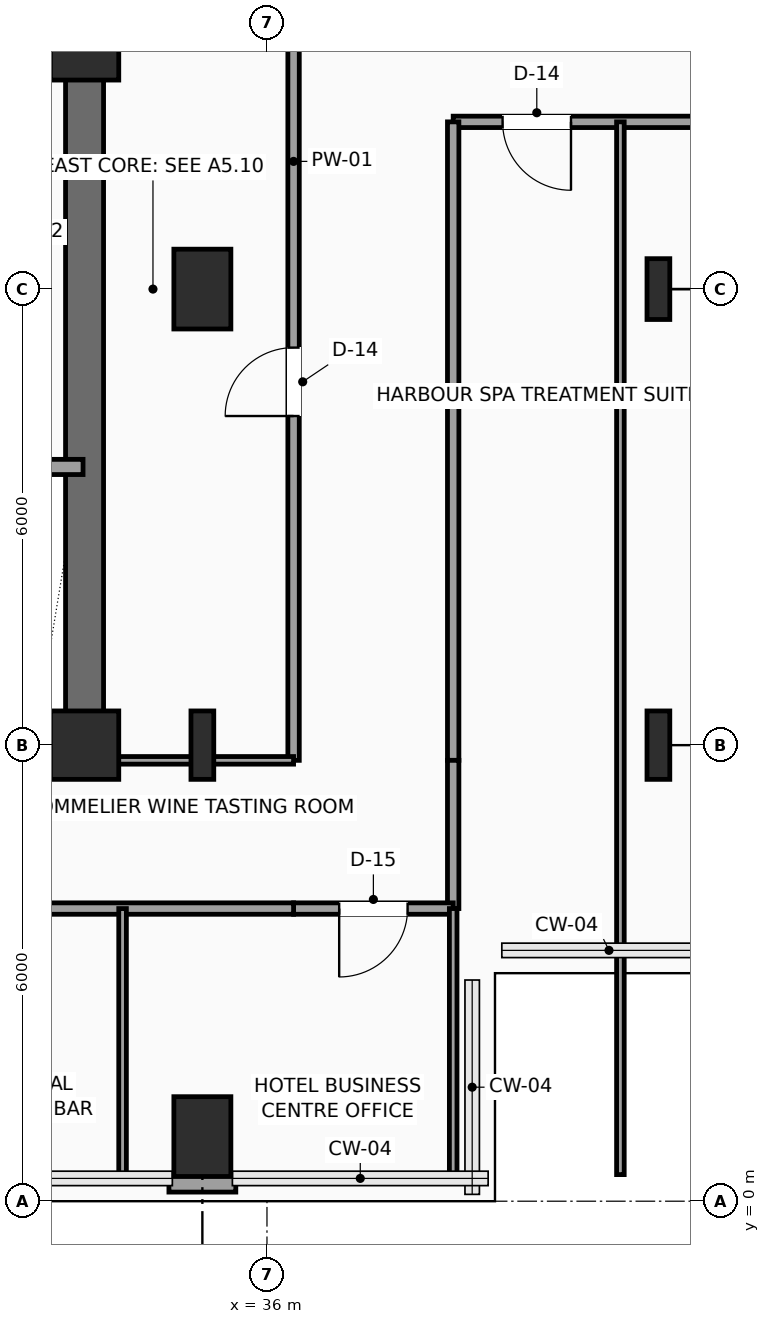
"""IFC4 building model, lengths in metres.
Left out: names, types, materials, properties, quantities, classifications, styles, units other than length and angle.
Written with IfcOpenShell. Run it as: python <this file> out.ifc"""

import sys

from ifc_helpers import new_model, si_unit, direction, frame, frame_2d, origin, origin_2d, place, context, subcontext, project, spatial, rectangle, i_section, extrude, element, fill, save


model = new_model("IFC4")
c1 = context("Model", 3, precision=1e-05, world=origin(), true_north=direction((0.0, 1.0)))
c2 = subcontext(c1, "Body", "Model", "MODEL_VIEW")
j1 = project(units=[si_unit("LENGTHUNIT", "METRE"), si_unit("PLANEANGLEUNIT", "RADIAN")], contexts=[c1])
p1 = place(None, origin())
s1 = spatial("IfcSite", under=j1, at=p1, CompositionType="ELEMENT")
p2 = place(p1, origin())
s2 = spatial("IfcBuilding", under=s1, at=p2, CompositionType="ELEMENT")
p3 = place(p2, frame((0.0, 0.0, 191.7)))
s3 = spatial("IfcBuildingStorey", under=s2, at=p3, CompositionType="ELEMENT", Elevation=191.7)
for number, where, z_axis, x_axis in (
    (1, (33.6, 6.0, 0.0), (0.0, 0.0, 1.0), (1.0, 0.0, 0.0)),
    (2, (33.6, 15.2, 0.0), (0.0, 0.0, 1.0), (1.0, 0.0, 0.0)),
):
    element("IfcColumn", number, at=place(p3, frame(where, z_axis=z_axis, x_axis=x_axis)), inside=s3, PredefinedType="COLUMN", context=c2, shape_type="SweptSolid", body=[
        extrude(rectangle(XDim=0.9, YDim=0.9, at=origin_2d()), origin(), (0.0, 0.0, 1.0), 3.75),
    ])
p4 = place(p3, frame((35.15, 0.85, 0.0), z_axis=(0.0, 0.0, 1.0), x_axis=(1.0, 0.0, 0.0)))
e3 = element("IfcColumn", 3, at=p4, inside=s3, PredefinedType="COLUMN", context=c2, shape_type="SweptSolid", body=[
    extrude(rectangle(XDim=0.75, YDim=1.05, at=origin_2d()), origin(), (0.0, 0.0, 1.0), 3.75),
])
p5 = place(p3, frame((35.15, 6.0, 0.0), z_axis=(0.0, 0.0, 1.0), x_axis=(1.0, 0.0, 0.0)))
e4 = element("IfcColumn", 4, at=p5, inside=s3, PredefinedType="COLUMN", context=c2, shape_type="SweptSolid", body=[
    extrude(i_section(OverallWidth=0.3, OverallDepth=0.9, WebThickness=0.019, FlangeThickness=0.035, FilletRadius=0.03, at=origin_2d()), origin(), (0.0, 0.0, 1.0), 3.75),
])
p6 = place(p3, frame((35.15, 12.0, 0.0), z_axis=(0.0, 0.0, 1.0), x_axis=(1.0, 0.0, 0.0)))
e5 = element("IfcColumn", 5, at=p6, inside=s3, PredefinedType="COLUMN", context=c2, shape_type="SweptSolid", body=[
    extrude(rectangle(XDim=0.75, YDim=1.05, at=origin_2d()), origin(), (0.0, 0.0, 1.0), 3.75),
])
p7 = place(p3, frame((41.15, 6.0, 0.0), z_axis=(0.0, 0.0, 1.0), x_axis=(1.0, 0.0, 0.0)))
e6 = element("IfcColumn", 6, at=p7, inside=s3, PredefinedType="COLUMN", context=c2, shape_type="SweptSolid", body=[
    extrude(i_section(OverallWidth=0.3, OverallDepth=0.9, WebThickness=0.019, FlangeThickness=0.035, FilletRadius=0.03, at=origin_2d()), origin(), (0.0, 0.0, 1.0), 3.75),
])
p8 = place(p3, frame((41.15, 12.0, 0.0), z_axis=(0.0, 0.0, 1.0), x_axis=(1.0, 0.0, 0.0)))
e7 = element("IfcColumn", 7, at=p8, inside=s3, PredefinedType="COLUMN", context=c2, shape_type="SweptSolid", body=[
    extrude(i_section(OverallWidth=0.3, OverallDepth=0.8, WebThickness=0.018, FlangeThickness=0.033, FilletRadius=0.03, at=origin_2d()), origin(), (0.0, 0.0, 1.0), 3.75),
])
p9 = place(p3, frame((35.59, 0.24, 0.0), z_axis=(0.0, 0.0, 1.0), x_axis=(-1.0, 0.0, 0.0)))
e8 = element("IfcWall", 8, at=p9, inside=s3, PredefinedType="SOLIDWALL", context=c2, shape_type="SweptSolid", body=[
    extrude(rectangle(XDim=0.88, YDim=0.24, at=frame_2d((0.44, 0.0))), origin(), (0.0, 0.0, 1.0), 3.54),
])
p10 = place(p3, frame((24.0, 6.0, 0.0), z_axis=(0.0, 0.0, 1.0), x_axis=(1.0, 0.0, 0.0)))
e9 = element("IfcWall", 9, at=p10, inside=s3, PredefinedType="SHEAR", context=c2, shape_type="SweptSolid", body=[
    extrude(rectangle(XDim=9.6, YDim=0.5, at=frame_2d((4.8, 0.0))), origin(), (0.0, 0.0, 1.0), 3.54),
])
p11 = place(p3, frame((33.6, 6.0, 0.0), z_axis=(0.0, 0.0, 1.0), x_axis=(0.0, 1.0, 0.0)))
e10 = element("IfcWall", 10, at=p11, inside=s3, PredefinedType="SHEAR", context=c2, shape_type="SweptSolid", body=[
    extrude(rectangle(XDim=12.0, YDim=0.5, at=frame_2d((6.0, 0.0))), origin(), (0.0, 0.0, 1.0), 3.54),
])
p12 = place(p11, frame((10.2, 0.0, 0.0)))
e11 = element("IfcOpeningElement", 11, at=p12, cuts=e10, PredefinedType="OPENING", context=c2, shape_type="SweptSolid", body=[
    extrude(rectangle(XDim=0.9, YDim=2.15, at=frame_2d((0.45, 1.075))), frame((0.0, 0.26, 0.0), z_axis=(0.0, -1.0, 0.0), x_axis=(1.0, 0.0, 0.0)), (0.0, 0.0, 1.0), 0.52),
])
p13 = place(p3, frame((29.26, 15.18, 0.0), z_axis=(0.0, 0.0, 1.0), x_axis=(1.0, 0.0, 0.0)))
e12 = element("IfcWall", 12, at=p13, inside=s3, PredefinedType="SHEAR", context=c2, shape_type="SweptSolid", body=[
    extrude(rectangle(XDim=4.04, YDim=0.2, at=frame_2d((2.02, 0.0))), origin(), (0.0, 0.0, 1.0), 3.54),
])
p14 = place(p3, frame((32.94, 9.66, 0.0), z_axis=(0.0, 0.0, 1.0), x_axis=(1.0, 0.0, 0.0)))
e13 = element("IfcWall", 13, at=p14, inside=s3, PredefinedType="SOLIDWALL", context=c2, shape_type="SweptSolid", body=[
    extrude(rectangle(XDim=0.64, YDim=0.2, at=frame_2d((0.32, 0.0))), origin(), (0.0, 0.0, 1.0), 3.54),
])
p15 = place(p3, frame((36.35, 5.8, 0.0), z_axis=(0.0, 0.0, 1.0), x_axis=(0.0, 1.0, 0.0)))
e14 = element("IfcWall", 14, at=p15, inside=s3, PredefinedType="PARTITIONING", context=c2, shape_type="SweptSolid", body=[
    extrude(rectangle(XDim=10.08, YDim=0.15, at=frame_2d((5.04, 0.0))), origin(), (0.0, 0.0, 1.0), 3.54),
])
p16 = place(p15, frame((4.53, 0.0, 0.0)))
e15 = element("IfcOpeningElement", 15, at=p16, cuts=e14, PredefinedType="OPENING", context=c2, shape_type="SweptSolid", body=[
    extrude(rectangle(XDim=0.9, YDim=2.1, at=frame_2d((0.45, 1.05))), frame((0.0, 0.085, 0.0), z_axis=(0.0, -1.0, 0.0), x_axis=(1.0, 0.0, 0.0)), (0.0, 0.0, 1.0), 0.17),
])
p17 = place(p3, frame((41.7, 14.2, 0.0), z_axis=(0.0, 0.0, 1.0), x_axis=(-1.0, 0.0, 0.0)))
e16 = element("IfcWall", 16, at=p17, inside=s3, PredefinedType="PARTITIONING", context=c2, shape_type="SweptSolid", body=[
    extrude(rectangle(XDim=3.25, YDim=0.15, at=frame_2d((1.625, 0.0))), origin(), (0.0, 0.0, 1.0), 3.54),
])
p18 = place(p17, frame((1.7, 0.0, 0.0)))
e17 = element("IfcOpeningElement", 17, at=p18, cuts=e16, PredefinedType="OPENING", context=c2, shape_type="SweptSolid", body=[
    extrude(rectangle(XDim=0.9, YDim=2.1, at=frame_2d((0.45, 1.05))), frame((0.0, 0.085, 0.0), z_axis=(0.0, -1.0, 0.0), x_axis=(1.0, 0.0, 0.0)), (0.0, 0.0, 1.0), 0.17),
])
p19 = place(p3, frame((38.45, 14.2, 0.0), z_axis=(0.0, 0.0, 1.0), x_axis=(0.0, -1.0, 0.0)))
e18 = element("IfcWall", 18, at=p19, inside=s3, PredefinedType="PARTITIONING", context=c2, shape_type="SweptSolid", body=[
    extrude(rectangle(XDim=8.4, YDim=0.15, at=frame_2d((4.2, 0.0))), origin(), (0.0, 0.0, 1.0), 3.54),
])
p20 = place(p3, frame((38.45, 5.8, 0.0), z_axis=(0.0, 0.0, 1.0), x_axis=(0.0, -1.0, 0.0)))
e19 = element("IfcWall", 19, at=p20, inside=s3, PredefinedType="PARTITIONING", context=c2, shape_type="SweptSolid", body=[
    extrude(rectangle(XDim=1.95, YDim=0.15, at=frame_2d((0.975, 0.0))), origin(), (0.0, 0.0, 1.0), 3.54),
])
p21 = place(p3, frame((38.45, 3.85, 0.0), z_axis=(0.0, 0.0, 1.0), x_axis=(-1.0, 0.0, 0.0)))
e20 = element("IfcWall", 20, at=p21, inside=s3, PredefinedType="PARTITIONING", context=c2, shape_type="SweptSolid", body=[
    extrude(rectangle(XDim=2.1, YDim=0.15, at=frame_2d((1.05, 0.0))), origin(), (0.0, 0.0, 1.0), 3.54),
])
p22 = place(p21, frame((0.6, 0.0, 0.0)))
e21 = element("IfcOpeningElement", 21, at=p22, cuts=e20, PredefinedType="OPENING", context=c2, shape_type="SweptSolid", body=[
    extrude(rectangle(XDim=0.9, YDim=2.1, at=frame_2d((0.45, 1.05))), frame((0.0, 0.085, 0.0), z_axis=(0.0, -1.0, 0.0), x_axis=(1.0, 0.0, 0.0)), (0.0, 0.0, 1.0), 0.17),
])
p23 = place(p3, frame((36.35, 3.85, 0.0), z_axis=(0.0, 0.0, 1.0), x_axis=(-1.0, 0.0, 0.0)))
e22 = element("IfcWall", 22, at=p23, inside=s3, PredefinedType="PARTITIONING", context=c2, shape_type="SweptSolid", body=[
    extrude(rectangle(XDim=12.4, YDim=0.15, at=frame_2d((6.2, 0.0))), origin(), (0.0, 0.0, 1.0), 3.54),
])
p24 = place(p23, frame((11.025, 0.0, 0.0)))
e23 = element("IfcOpeningElement", 23, at=p24, cuts=e22, PredefinedType="OPENING", context=c2, shape_type="SweptSolid", body=[
    extrude(rectangle(XDim=0.9, YDim=2.1, at=frame_2d((0.45, 1.05))), frame((0.0, 0.085, 0.0), z_axis=(0.0, -1.0, 0.0), x_axis=(1.0, 0.0, 0.0)), (0.0, 0.0, 1.0), 0.17),
])
p25 = place(p23, frame((8.05, 0.0, 0.0)))
e24 = element("IfcOpeningElement", 24, at=p25, cuts=e22, PredefinedType="OPENING", context=c2, shape_type="SweptSolid", body=[
    extrude(rectangle(XDim=0.9, YDim=2.1, at=frame_2d((0.45, 1.05))), frame((0.0, 0.085, 0.0), z_axis=(0.0, -1.0, 0.0), x_axis=(1.0, 0.0, 0.0)), (0.0, 0.0, 1.0), 0.17),
])
p26 = place(p23, frame((3.9, 0.0, 0.0)))
e25 = element("IfcOpeningElement", 25, at=p26, cuts=e22, PredefinedType="OPENING", context=c2, shape_type="SweptSolid", body=[
    extrude(rectangle(XDim=0.9, YDim=2.1, at=frame_2d((0.45, 1.05))), frame((0.0, 0.085, 0.0), z_axis=(0.0, -1.0, 0.0), x_axis=(1.0, 0.0, 0.0)), (0.0, 0.0, 1.0), 0.17),
])
for number, where, z_axis, x_axis in (
    (26, (34.1, 0.3, 0.0), (0.0, 0.0, 1.0), (0.0, 1.0, 0.0)),
    (27, (38.45, 0.3, 0.0), (0.0, 0.0, 1.0), (0.0, 1.0, 0.0)),
):
    element("IfcWall", number, at=place(p3, frame(where, z_axis=z_axis, x_axis=x_axis)), inside=s3, PredefinedType="PARTITIONING", context=c2, shape_type="SweptSolid", body=[
        extrude(rectangle(XDim=3.55, YDim=0.1, at=frame_2d((1.775, 0.0))), origin(), (0.0, 0.0, 1.0), 3.54),
    ])
p27 = place(p3, frame((33.65, 5.8, 0.0), z_axis=(0.0, 0.0, 1.0), x_axis=(1.0, 0.0, 0.0)))
e28 = element("IfcWall", 28, at=p27, inside=s3, PredefinedType="PARTITIONING", context=c2, shape_type="SweptSolid", body=[
    extrude(rectangle(XDim=2.7, YDim=0.1, at=frame_2d((1.35, 0.0))), origin(), (0.0, 0.0, 1.0), 3.132),
])
p28 = place(p3, frame((40.65, 0.35, 0.0), z_axis=(0.0, 0.0, 1.0), x_axis=(0.0, 1.0, 0.0)))
e29 = element("IfcWall", 29, at=p28, inside=s3, PredefinedType="PARTITIONING", context=c2, shape_type="SweptSolid", body=[
    extrude(rectangle(XDim=13.85, YDim=0.1, at=frame_2d((6.925, 0.0))), origin(), (0.0, 0.0, 1.0), 3.54),
])
p29 = place(p16, origin())
e30 = element("IfcDoor", 30, at=p29, inside=s3, OperationType="SINGLE_SWING_LEFT", PredefinedType="DOOR", context=c2, shape_type="SweptSolid", body=[
    extrude(rectangle(XDim=0.9, YDim=2.1, at=frame_2d((0.45, 1.05))), frame((0.0, 0.025, 0.0), z_axis=(0.0, -1.0, 0.0), x_axis=(1.0, 0.0, 0.0)), (0.0, 0.0, 1.0), 0.05),
])
fill(e15, e30)
p30 = place(p18, origin())
e31 = element("IfcDoor", 31, at=p30, inside=s3, OperationType="SINGLE_SWING_LEFT", PredefinedType="DOOR", context=c2, shape_type="SweptSolid", body=[
    extrude(rectangle(XDim=0.9, YDim=2.1, at=frame_2d((0.45, 1.05))), frame((0.0, 0.025, 0.0), z_axis=(0.0, -1.0, 0.0), x_axis=(1.0, 0.0, 0.0)), (0.0, 0.0, 1.0), 0.05),
])
fill(e17, e31)
p31 = place(p22, origin())
e32 = element("IfcDoor", 32, at=p31, inside=s3, OperationType="SINGLE_SWING_RIGHT", PredefinedType="DOOR", context=c2, shape_type="SweptSolid", body=[
    extrude(rectangle(XDim=0.9, YDim=2.1, at=frame_2d((0.45, 1.05))), frame((0.0, 0.025, 0.0), z_axis=(0.0, -1.0, 0.0), x_axis=(1.0, 0.0, 0.0)), (0.0, 0.0, 1.0), 0.05),
])
fill(e21, e32)
save(model, sys.argv[1])
